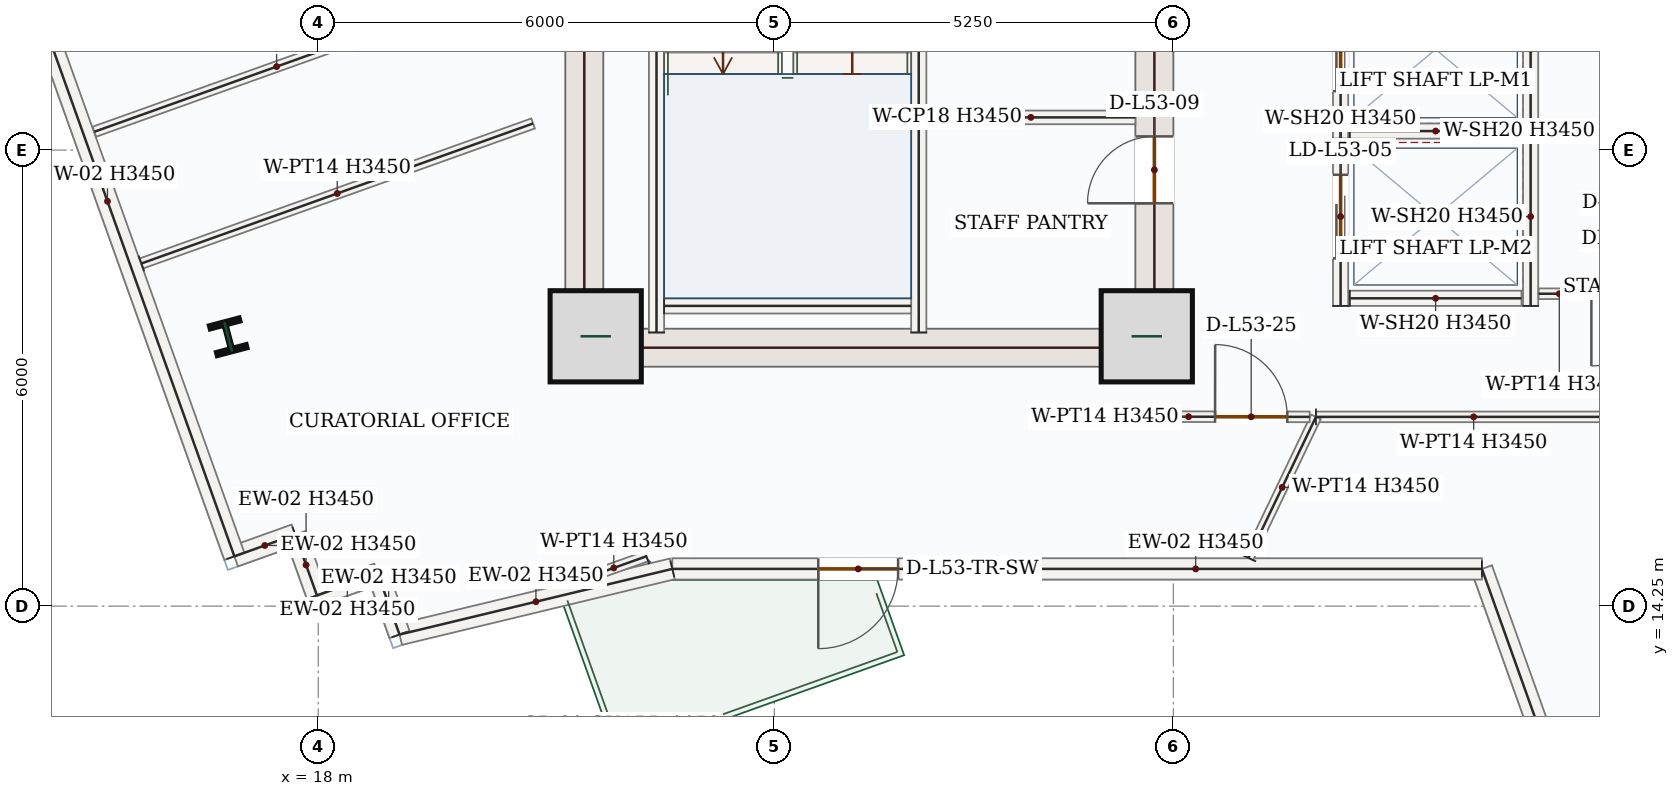
"""IFC4 building model, lengths in metres.
Left out: names, types, materials, properties, quantities, classifications, styles, units other than length and angle.
Written with IfcOpenShell. Run it as: python <this file> out.ifc"""

import sys

from ifc_helpers import new_model, si_unit, direction, frame, frame_2d, origin, origin_2d, place, context, subcontext, project, spatial, rectangle, i_section, extrude, source, transform, mapped, element, fill, save


model = new_model("IFC4")
c1 = context("Model", 3, precision=1e-05, world=origin(), true_north=direction((0.0, 1.0)))
c2 = subcontext(c1, "Body", "Model", "MODEL_VIEW")
j1 = project(units=[si_unit("LENGTHUNIT", "METRE"), si_unit("PLANEANGLEUNIT", "RADIAN")], contexts=[c1])
p1 = place(None, origin())
s1 = spatial("IfcSite", under=j1, at=p1, CompositionType="ELEMENT")
p2 = place(p1, origin())
s2 = spatial("IfcBuilding", under=s1, at=p2, CompositionType="ELEMENT")
p3 = place(p2, frame((0.0, 0.0, 225.3)))
s3 = spatial("IfcBuildingStorey", under=s2, at=p3, CompositionType="ELEMENT", Elevation=225.3)
m1 = source(origin(), c2, "Body", "SweptSolid", [
    extrude(rectangle(XDim=8.55, YDim=0.5, at=frame_2d((4.275, 0.0))), origin(), (0.0, 0.0, 1.0), 3.45),
])
p4 = place(p3, frame((21.5, 17.4, 0.0), z_axis=(0.0, 0.0, 1.0), x_axis=(0.0, 1.0, 0.0)))
e1 = element("IfcWall", 1, at=p4, inside=s3, PredefinedType="SHEAR", context=c2, shape_type="MappedRepresentation", body=[
    mapped(m1, transform((0.0, 0.0, 0.0), x_axis=(1.0, 0.0, 0.0), y_axis=(0.0, 1.0, 0.0), z_axis=(0.0, 0.0, 1.0), scale=1.0)),
])
p5 = place(p3, frame((29.0, 17.4, 0.0), z_axis=(0.0, 0.0, 1.0), x_axis=(0.0, 1.0, 0.0)))
e2 = element("IfcWall", 2, at=p5, inside=s3, PredefinedType="SHEAR", context=c2, shape_type="SweptSolid", body=[
    extrude(rectangle(XDim=8.55, YDim=0.5, at=frame_2d((4.275, 0.0))), origin(), (0.0, 0.0, 1.0), 3.45),
])
p6 = place(p5, frame((6.65, 0.0, 0.0)))
e3 = element("IfcOpeningElement", 3, at=p6, cuts=e2, PredefinedType="OPENING", context=c2, shape_type="SweptSolid", body=[
    extrude(rectangle(XDim=1.1, YDim=2.2, at=frame_2d((0.55, 1.1))), frame((0.0, 0.26, 0.0), z_axis=(0.0, -1.0, 0.0), x_axis=(1.0, 0.0, 0.0)), (0.0, 0.0, 1.0), 0.52),
])
p7 = place(p5, frame((2.15, 0.0, 0.0)))
e4 = element("IfcOpeningElement", 4, at=p7, cuts=e2, PredefinedType="OPENING", context=c2, shape_type="SweptSolid", body=[
    extrude(rectangle(XDim=0.88, YDim=2.1, at=frame_2d((0.44, 1.05))), frame((0.0, 0.26, 0.0), z_axis=(0.0, -1.0, 0.0), x_axis=(1.0, 0.0, 0.0)), (0.0, 0.0, 1.0), 0.52),
])
p8 = place(p5, frame((4.25, 0.0, 0.0)))
e5 = element("IfcOpeningElement", 5, at=p8, cuts=e2, PredefinedType="OPENING", context=c2, shape_type="SweptSolid", body=[
    extrude(rectangle(XDim=0.88, YDim=2.1, at=frame_2d((0.44, 1.05))), frame((0.0, 0.26, 0.0), z_axis=(0.0, -1.0, 0.0), x_axis=(1.0, 0.0, 0.0)), (0.0, 0.0, 1.0), 0.52),
])
m2 = source(origin(), c2, "Body", "SweptSolid", [
    extrude(rectangle(XDim=7.0, YDim=0.5, at=frame_2d((3.5, 0.0))), origin(), (0.0, 0.0, 1.0), 3.45),
])
p9 = place(p3, frame((21.75, 17.65, 0.0), z_axis=(0.0, 0.0, 1.0), x_axis=(1.0, 0.0, 0.0)))
e6 = element("IfcWall", 6, at=p9, inside=s3, PredefinedType="SHEAR", context=c2, shape_type="MappedRepresentation", body=[
    mapped(m2, transform((0.0, 0.0, 0.0), x_axis=(1.0, 0.0, 0.0), y_axis=(0.0, 1.0, 0.0), z_axis=(0.0, 0.0, 1.0), scale=1.0)),
])
m3 = source(origin(), c2, "Body", "SweptSolid", [
    extrude(rectangle(XDim=1.2, YDim=1.2, at=origin_2d()), origin(), (0.0, 0.0, 1.0), 3.9),
])
for number, where, z_axis, x_axis in (
    (7, (21.65, 17.8, 0.0), (0.0, 0.0, 1.0), (1.0, 0.0, 0.0)),
    (8, (28.9, 17.8, 0.0), (0.0, 0.0, 1.0), (1.0, 0.0, 0.0)),
):
    element("IfcColumn", number, at=place(p3, frame(where, z_axis=z_axis, x_axis=x_axis)), inside=s3, PredefinedType="COLUMN", context=c2, shape_type="MappedRepresentation", body=[
        mapped(m3, transform((0.0, 0.0, 0.0), x_axis=(1.0, 0.0, 0.0), y_axis=(0.0, 1.0, 0.0), z_axis=(0.0, 0.0, 1.0), scale=1.0)),
    ])
m4 = source(origin(), c2, "Body", "SweptSolid", [
    extrude(i_section(OverallWidth=0.404, OverallDepth=0.407, WebThickness=0.027, FlangeThickness=0.044, FilletRadius=0.018, at=origin_2d()), origin(), (0.0, 0.0, 1.0), 3.9),
])
p10 = place(p3, frame((16.815, 17.794, 0.0), z_axis=(0.0, 0.0, 1.0), x_axis=(0.966823388604, 0.255445757936, 0.0)))
e9 = element("IfcColumn", 9, at=p10, inside=s3, PredefinedType="COLUMN", context=c2, shape_type="MappedRepresentation", body=[
    mapped(m4, transform((0.0, 0.0, 0.0), x_axis=(1.0, 0.0, 0.0), y_axis=(0.0, 1.0, 0.0), z_axis=(0.0, 0.0, 1.0), scale=1.0)),
])
m5 = source(origin(), c2, "Body", "SweptSolid", [
    extrude(rectangle(XDim=8.721, YDim=0.28, at=frame_2d((4.36, 0.0))), origin(), (0.0, 0.0, 1.0), 3.45),
])
p11 = place(p3, frame((36.244, 6.528, 0.0), z_axis=(0.0, 0.0, 1.0), x_axis=(-0.336554520074, 0.941663982011, 0.0)))
e10 = element("IfcWall", 10, at=p11, inside=s3, PredefinedType="SOLIDWALL", context=c2, shape_type="MappedRepresentation", body=[
    mapped(m5, transform((0.0, 0.0, 0.0), x_axis=(1.0, 0.0, 0.0), y_axis=(0.0, 1.0, 0.0), z_axis=(0.0, 0.0, 1.0), scale=1.0)),
])
p12 = place(p3, frame((33.309, 14.74, 0.0), z_axis=(0.0, 0.0, 1.0), x_axis=(-1.0, 0.0, 0.0)))
e11 = element("IfcWall", 11, at=p12, inside=s3, PredefinedType="SOLIDWALL", context=c2, shape_type="SweptSolid", body=[
    extrude(rectangle(XDim=10.651, YDim=0.28, at=frame_2d((5.326, 0.0))), origin(), (0.0, 0.0, 1.0), 3.45),
])
p13 = place(p12, frame((7.681, 0.0, 0.0)))
e12 = element("IfcOpeningElement", 12, at=p13, cuts=e11, PredefinedType="OPENING", context=c2, shape_type="SweptSolid", body=[
    extrude(rectangle(XDim=1.05, YDim=2.15, at=frame_2d((0.525, 1.075))), frame((0.0, 0.15, 0.0), z_axis=(0.0, -1.0, 0.0), x_axis=(1.0, 0.0, 0.0)), (0.0, 0.0, 1.0), 0.3),
])
m6 = source(origin(), c2, "Body", "SweptSolid", [
    extrude(rectangle(XDim=3.691, YDim=0.28, at=frame_2d((1.846, 0.0))), origin(), (0.0, 0.0, 1.0), 3.45),
])
p14 = place(p3, frame((22.658, 14.74, 0.0), z_axis=(0.0, 0.0, 1.0), x_axis=(-0.972237013355, -0.233998268929, 0.0)))
e13 = element("IfcWall", 13, at=p14, inside=s3, PredefinedType="SOLIDWALL", context=c2, shape_type="MappedRepresentation", body=[
    mapped(m6, transform((0.0, 0.0, 0.0), x_axis=(1.0, 0.0, 0.0), y_axis=(0.0, 1.0, 0.0), z_axis=(0.0, 0.0, 1.0), scale=1.0)),
])
m7 = source(origin(), c2, "Body", "SweptSolid", [
    extrude(rectangle(XDim=0.85, YDim=0.28, at=frame_2d((0.425, 0.0))), origin(), (0.0, 0.0, 1.0), 3.45),
])
p15 = place(p3, frame((19.069, 13.876, 0.0), z_axis=(0.0, 0.0, 1.0), x_axis=(-0.336481891926, 0.941689936447, 0.0)))
e14 = element("IfcWall", 14, at=p15, inside=s3, PredefinedType="SOLIDWALL", context=c2, shape_type="MappedRepresentation", body=[
    mapped(m7, transform((0.0, 0.0, 0.0), x_axis=(1.0, 0.0, 0.0), y_axis=(0.0, 1.0, 0.0), z_axis=(0.0, 0.0, 1.0), scale=1.0)),
])
m8 = source(origin(), c2, "Body", "SweptSolid", [
    extrude(rectangle(XDim=0.85, YDim=0.28, at=frame_2d((0.425, 0.0))), origin(), (0.0, 0.0, 1.0), 3.45),
])
for number, where, z_axis, x_axis in (
    (15, (18.783, 14.677, 0.0), (0.0, 0.0, 1.0), (-0.942, -0.337, 0.0)),
    (16, (17.983, 14.391, 0.0), (0.0, 0.0, 1.0), (-0.337, 0.942, 0.0)),
):
    element("IfcWall", number, at=place(p3, frame(where, z_axis=z_axis, x_axis=x_axis)), inside=s3, PredefinedType="SOLIDWALL", context=c2, shape_type="MappedRepresentation", body=[
        mapped(m8, transform((0.0, 0.0, 0.0), x_axis=(1.0, 0.0, 0.0), y_axis=(0.0, 1.0, 0.0), z_axis=(0.0, 0.0, 1.0), scale=1.0)),
    ])
m9 = source(origin(), c2, "Body", "SweptSolid", [
    extrude(rectangle(XDim=0.85, YDim=0.28, at=frame_2d((0.425, 0.0))), origin(), (0.0, 0.0, 1.0), 3.45),
])
p16 = place(p3, frame((17.697, 15.191, 0.0), z_axis=(0.0, 0.0, 1.0), x_axis=(-0.941657417713, -0.336572886112, 0.0)))
e17 = element("IfcWall", 17, at=p16, inside=s3, PredefinedType="SOLIDWALL", context=c2, shape_type="MappedRepresentation", body=[
    mapped(m9, transform((0.0, 0.0, 0.0), x_axis=(1.0, 0.0, 0.0), y_axis=(0.0, 1.0, 0.0), z_axis=(0.0, 0.0, 1.0), scale=1.0)),
])
m10 = source(origin(), c2, "Body", "SweptSolid", [
    extrude(rectangle(XDim=9.92, YDim=0.28, at=frame_2d((4.96, 0.0))), origin(), (0.0, 0.0, 1.0), 3.45),
])
p17 = place(p3, frame((16.896, 14.905, 0.0), z_axis=(0.0, 0.0, 1.0), x_axis=(-0.336532833412, 0.941671732631, 0.0)))
e18 = element("IfcWall", 18, at=p17, inside=s3, PredefinedType="SOLIDWALL", context=c2, shape_type="MappedRepresentation", body=[
    mapped(m10, transform((0.0, 0.0, 0.0), x_axis=(1.0, 0.0, 0.0), y_axis=(0.0, 1.0, 0.0), z_axis=(0.0, 0.0, 1.0), scale=1.0)),
])
m11 = source(origin(), c2, "Body", "SweptSolid", [
    extrude(rectangle(XDim=7.87, YDim=0.2, at=frame_2d((3.935, 0.0))), origin(), (0.0, 0.0, 1.0), 3.45),
])
p18 = place(p3, frame((22.45, 17.85, 0.0), z_axis=(0.0, 0.0, 1.0), x_axis=(0.0, 1.0, 0.0)))
e19 = element("IfcWall", 19, at=p18, inside=s3, PredefinedType="SOLIDWALL", context=c2, shape_type="MappedRepresentation", body=[
    mapped(m11, transform((0.0, 0.0, 0.0), x_axis=(1.0, 0.0, 0.0), y_axis=(0.0, 1.0, 0.0), z_axis=(0.0, 0.0, 1.0), scale=1.0)),
])
p19 = place(p3, frame((25.9, 17.85, 0.0), z_axis=(0.0, 0.0, 1.0), x_axis=(0.0, 1.0, 0.0)))
e20 = element("IfcWall", 20, at=p19, inside=s3, PredefinedType="SOLIDWALL", context=c2, shape_type="SweptSolid", body=[
    extrude(rectangle(XDim=8.0, YDim=0.2, at=frame_2d((4.0, 0.0))), origin(), (0.0, 0.0, 1.0), 3.45),
])
p20 = place(p19, frame((6.3, 0.0, 0.0)))
e21 = element("IfcOpeningElement", 21, at=p20, cuts=e20, PredefinedType="OPENING", context=c2, shape_type="SweptSolid", body=[
    extrude(rectangle(XDim=1.05, YDim=2.15, at=frame_2d((0.525, 1.075))), frame((0.0, 0.11, 0.0), z_axis=(0.0, -1.0, 0.0), x_axis=(1.0, 0.0, 0.0)), (0.0, 0.0, 1.0), 0.22),
])
m12 = source(origin(), c2, "Body", "SweptSolid", [
    extrude(rectangle(XDim=3.25, YDim=0.2, at=frame_2d((1.625, 0.0))), origin(), (0.0, 0.0, 1.0), 3.45),
])
p21 = place(p3, frame((22.55, 18.2, 0.0), z_axis=(0.0, 0.0, 1.0), x_axis=(1.0, 0.0, 0.0)))
e22 = element("IfcWall", 22, at=p21, inside=s3, PredefinedType="SOLIDWALL", context=c2, shape_type="MappedRepresentation", body=[
    mapped(m12, transform((0.0, 0.0, 0.0), x_axis=(1.0, 0.0, 0.0), y_axis=(0.0, 1.0, 0.0), z_axis=(0.0, 0.0, 1.0), scale=1.0)),
])
m13 = source(origin(), c2, "Body", "SweptSolid", [
    extrude(rectangle(XDim=2.75, YDim=0.18, at=frame_2d((1.375, 0.0))), origin(), (0.0, 0.0, 1.0), 3.45),
])
p22 = place(p3, frame((26.0, 20.68, 0.0), z_axis=(0.0, 0.0, 1.0), x_axis=(1.0, 0.0, 0.0)))
e23 = element("IfcWall", 23, at=p22, inside=s3, PredefinedType="PARTITIONING", context=c2, shape_type="MappedRepresentation", body=[
    mapped(m13, transform((0.0, 0.0, 0.0), x_axis=(1.0, 0.0, 0.0), y_axis=(0.0, 1.0, 0.0), z_axis=(0.0, 0.0, 1.0), scale=1.0)),
])
p23 = place(p3, frame((31.45, 20.4, 0.0), z_axis=(0.0, 0.0, 1.0), x_axis=(0.0, 1.0, 0.0)))
e24 = element("IfcWall", 24, at=p23, inside=s3, PredefinedType="SOLIDWALL", context=c2, shape_type="SweptSolid", body=[
    extrude(rectangle(XDim=2.35, YDim=0.2, at=frame_2d((1.175, 0.0))), origin(), (0.0, 0.0, 1.0), 3.45),
])
p24 = place(p23, frame((0.625, 0.0, 0.0)))
e25 = element("IfcOpeningElement", 25, at=p24, cuts=e24, PredefinedType="OPENING", context=c2, shape_type="SweptSolid", body=[
    extrude(rectangle(XDim=1.1, YDim=2.15, at=frame_2d((0.55, 1.075))), frame((0.0, 0.11, 0.0), z_axis=(0.0, -1.0, 0.0), x_axis=(1.0, 0.0, 0.0)), (0.0, 0.0, 1.0), 0.22),
])
m14 = source(origin(), c2, "Body", "SweptSolid", [
    extrude(rectangle(XDim=2.35, YDim=0.2, at=frame_2d((1.175, 0.0))), origin(), (0.0, 0.0, 1.0), 3.45),
])
p25 = place(p3, frame((33.95, 20.4, 0.0), z_axis=(0.0, 0.0, 1.0), x_axis=(0.0, 1.0, 0.0)))
e26 = element("IfcWall", 26, at=p25, inside=s3, PredefinedType="SOLIDWALL", context=c2, shape_type="MappedRepresentation", body=[
    mapped(m14, transform((0.0, 0.0, 0.0), x_axis=(1.0, 0.0, 0.0), y_axis=(0.0, 1.0, 0.0), z_axis=(0.0, 0.0, 1.0), scale=1.0)),
])
m15 = source(origin(), c2, "Body", "SweptSolid", [
    extrude(rectangle(XDim=2.26, YDim=0.2, at=frame_2d((1.13, 0.0))), origin(), (0.0, 0.0, 1.0), 3.45),
])
p26 = place(p3, frame((31.57, 20.5, 0.0), z_axis=(0.0, 0.0, 1.0), x_axis=(1.0, 0.0, 0.0)))
e27 = element("IfcWall", 27, at=p26, inside=s3, PredefinedType="SOLIDWALL", context=c2, shape_type="MappedRepresentation", body=[
    mapped(m15, transform((0.0, 0.0, 0.0), x_axis=(1.0, 0.0, 0.0), y_axis=(0.0, 1.0, 0.0), z_axis=(0.0, 0.0, 1.0), scale=1.0)),
])
p27 = place(p3, frame((31.45, 18.2, 0.0), z_axis=(0.0, 0.0, 1.0), x_axis=(0.0, 1.0, 0.0)))
e28 = element("IfcWall", 28, at=p27, inside=s3, PredefinedType="SOLIDWALL", context=c2, shape_type="SweptSolid", body=[
    extrude(rectangle(XDim=2.35, YDim=0.2, at=frame_2d((1.175, 0.0))), origin(), (0.0, 0.0, 1.0), 3.45),
])
p28 = place(p27, frame((0.625, 0.0, 0.0)))
e29 = element("IfcOpeningElement", 29, at=p28, cuts=e28, PredefinedType="OPENING", context=c2, shape_type="SweptSolid", body=[
    extrude(rectangle(XDim=1.1, YDim=2.15, at=frame_2d((0.55, 1.075))), frame((0.0, 0.11, 0.0), z_axis=(0.0, -1.0, 0.0), x_axis=(1.0, 0.0, 0.0)), (0.0, 0.0, 1.0), 0.22),
])
p29 = place(p3, frame((33.95, 18.2, 0.0), z_axis=(0.0, 0.0, 1.0), x_axis=(0.0, 1.0, 0.0)))
e30 = element("IfcWall", 30, at=p29, inside=s3, PredefinedType="SOLIDWALL", context=c2, shape_type="MappedRepresentation", body=[
    mapped(m14, transform((0.0, 0.0, 0.0), x_axis=(1.0, 0.0, 0.0), y_axis=(0.0, 1.0, 0.0), z_axis=(0.0, 0.0, 1.0), scale=1.0)),
])
p30 = place(p3, frame((31.57, 18.3, 0.0), z_axis=(0.0, 0.0, 1.0), x_axis=(1.0, 0.0, 0.0)))
e31 = element("IfcWall", 31, at=p30, inside=s3, PredefinedType="SOLIDWALL", context=c2, shape_type="MappedRepresentation", body=[
    mapped(m15, transform((0.0, 0.0, 0.0), x_axis=(1.0, 0.0, 0.0), y_axis=(0.0, 1.0, 0.0), z_axis=(0.0, 0.0, 1.0), scale=1.0)),
])
p31 = place(p3, frame((35.895, 18.36, 0.0), z_axis=(0.0, 0.0, 1.0), x_axis=(-1.0, 0.0, 0.0)))
e32 = element("IfcWall", 32, at=p31, inside=s3, PredefinedType="PARTITIONING", context=c2, shape_type="SweptSolid", body=[
    extrude(rectangle(XDim=1.84, YDim=0.14, at=frame_2d((0.92, 0.0))), origin(), (0.0, 0.0, 1.0), 3.45),
])
p32 = place(p31, frame((0.196, 0.0, 0.0)))
e33 = element("IfcOpeningElement", 33, at=p32, cuts=e32, PredefinedType="OPENING", context=c2, shape_type="SweptSolid", body=[
    extrude(rectangle(XDim=0.95, YDim=2.15, at=frame_2d((0.475, 1.075))), frame((0.0, 0.08, 0.0), z_axis=(0.0, -1.0, 0.0), x_axis=(1.0, 0.0, 0.0)), (0.0, 0.0, 1.0), 0.16),
])
m16 = source(origin(), c2, "Body", "SweptSolid", [
    extrude(rectangle(XDim=5.093, YDim=0.14, at=frame_2d((2.547, 0.0))), origin(), (0.0, 0.0, 1.0), 3.45),
])
p33 = place(p3, frame((19.85, 22.205, 0.0), z_axis=(0.0, 0.0, 1.0), x_axis=(-0.941667058904, -0.336545910947, 0.0)))
e34 = element("IfcWall", 34, at=p33, inside=s3, PredefinedType="PARTITIONING", context=c2, shape_type="MappedRepresentation", body=[
    mapped(m16, transform((0.0, 0.0, 0.0), x_axis=(1.0, 0.0, 0.0), y_axis=(0.0, 1.0, 0.0), z_axis=(0.0, 0.0, 1.0), scale=1.0)),
])
p34 = place(p3, frame((31.126, 16.74, 0.0), z_axis=(0.0, 0.0, 1.0), x_axis=(1.0, 0.0, 0.0)))
e35 = element("IfcWall", 35, at=p34, inside=s3, PredefinedType="PARTITIONING", context=c2, shape_type="SweptSolid", body=[
    extrude(rectangle(XDim=7.564, YDim=0.14, at=frame_2d((3.782, 0.0))), origin(), (0.0, 0.0, 1.0), 3.45),
])
p35 = place(p34, frame((4.299, 0.0, 0.0)))
e36 = element("IfcOpeningElement", 36, at=p35, cuts=e35, PredefinedType="OPENING", context=c2, shape_type="SweptSolid", body=[
    extrude(rectangle(XDim=0.95, YDim=2.15, at=frame_2d((0.475, 1.075))), frame((0.0, 0.08, 0.0), z_axis=(0.0, -1.0, 0.0), x_axis=(1.0, 0.0, 0.0)), (0.0, 0.0, 1.0), 0.16),
])
m17 = source(origin(), c2, "Body", "SweptSolid", [
    extrude(rectangle(XDim=2.057, YDim=0.14, at=frame_2d((1.028, 0.0))), origin(), (0.0, 0.0, 1.0), 3.45),
])
p36 = place(p3, frame((30.237, 14.885, 0.0), z_axis=(0.0, 0.0, 1.0), x_axis=(0.43214833388, 0.90180253799, 0.0)))
e37 = element("IfcWall", 37, at=p36, inside=s3, PredefinedType="PARTITIONING", context=c2, shape_type="MappedRepresentation", body=[
    mapped(m17, transform((0.0, 0.0, 0.0), x_axis=(1.0, 0.0, 0.0), y_axis=(0.0, 1.0, 0.0), z_axis=(0.0, 0.0, 1.0), scale=1.0)),
])
p37 = place(p3, frame((29.252, 16.743, 0.0), z_axis=(0.0, 0.0, 1.0), x_axis=(0.999998876126, -0.00149924869, 0.0)))
e38 = element("IfcWall", 38, at=p37, inside=s3, PredefinedType="PARTITIONING", context=c2, shape_type="SweptSolid", body=[
    extrude(rectangle(XDim=1.791, YDim=0.14, at=frame_2d((0.896, 0.0))), origin(), (0.0, 0.0, 1.0), 3.45),
])
p38 = place(p37, frame((0.547, 0.0, 0.0)))
e39 = element("IfcOpeningElement", 39, at=p38, cuts=e38, PredefinedType="OPENING", context=c2, shape_type="SweptSolid", body=[
    extrude(rectangle(XDim=0.95, YDim=2.15, at=frame_2d((0.475, 1.075))), frame((0.0, 0.08, 0.0), z_axis=(0.0, -1.0, 0.0), x_axis=(1.0, 0.0, 0.0)), (0.0, 0.0, 1.0), 0.16),
])
m18 = source(origin(), c2, "Body", "SweptSolid", [
    extrude(rectangle(XDim=0.911, YDim=0.14, at=frame_2d((0.456, 0.0))), origin(), (0.0, 0.0, 1.0), 3.45),
])
p39 = place(p3, frame((22.317, 14.906, 0.0), z_axis=(0.0, 0.0, 1.0), x_axis=(-0.942111242134, -0.335300473374, 0.0)))
e40 = element("IfcWall", 40, at=p39, inside=s3, PredefinedType="PARTITIONING", context=c2, shape_type="MappedRepresentation", body=[
    mapped(m18, transform((0.0, 0.0, 0.0), x_axis=(1.0, 0.0, 0.0), y_axis=(0.0, 1.0, 0.0), z_axis=(0.0, 0.0, 1.0), scale=1.0)),
])
m19 = source(origin(), c2, "Body", "SweptSolid", [
    extrude(rectangle(XDim=5.473, YDim=0.14, at=frame_2d((2.736, 0.0))), origin(), (0.0, 0.0, 1.0), 3.45),
])
p40 = place(p3, frame((15.673, 18.758, 0.0), z_axis=(0.0, 0.0, 1.0), x_axis=(0.941665179086, 0.336551170695, 0.0)))
e41 = element("IfcWall", 41, at=p40, inside=s3, PredefinedType="PARTITIONING", context=c2, shape_type="MappedRepresentation", body=[
    mapped(m19, transform((0.0, 0.0, 0.0), x_axis=(1.0, 0.0, 0.0), y_axis=(0.0, 1.0, 0.0), z_axis=(0.0, 0.0, 1.0), scale=1.0)),
])
m20 = source(origin(), c2, "Body", "SweptSolid", [
    extrude(rectangle(XDim=1.05, YDim=2.15, at=frame_2d((0.525, 1.075))), frame((0.0, 0.025, 0.0), z_axis=(0.0, -1.0, 0.0), x_axis=(1.0, 0.0, 0.0)), (0.0, 0.0, 1.0), 0.05),
])
p41 = place(p13, origin())
e42 = element("IfcDoor", 42, at=p41, inside=s3, OperationType="SINGLE_SWING_RIGHT", PredefinedType="DOOR", context=c2, shape_type="MappedRepresentation", body=[
    mapped(m20, transform((0.0, 0.0, 0.0), x_axis=(1.0, 0.0, 0.0), y_axis=(0.0, 1.0, 0.0), z_axis=(0.0, 0.0, 1.0), scale=1.0)),
])
fill(e12, e42)
m21 = source(origin(), c2, "Body", "SweptSolid", [
    extrude(rectangle(XDim=0.88, YDim=2.1, at=frame_2d((0.44, 1.05))), frame((0.0, 0.025, 0.0), z_axis=(0.0, -1.0, 0.0), x_axis=(1.0, 0.0, 0.0)), (0.0, 0.0, 1.0), 0.05),
])
p42 = place(p7, origin())
e43 = element("IfcDoor", 43, at=p42, inside=s3, OperationType="SINGLE_SWING_LEFT", PredefinedType="DOOR", context=c2, shape_type="MappedRepresentation", body=[
    mapped(m21, transform((0.0, 0.0, 0.0), x_axis=(1.0, 0.0, 0.0), y_axis=(0.0, 1.0, 0.0), z_axis=(0.0, 0.0, 1.0), scale=1.0)),
])
fill(e4, e43)
m22 = source(origin(), c2, "Body", "SweptSolid", [
    extrude(rectangle(XDim=1.1, YDim=2.15, at=frame_2d((0.55, 1.075))), frame((0.0, 0.025, 0.0), z_axis=(0.0, -1.0, 0.0), x_axis=(1.0, 0.0, 0.0)), (0.0, 0.0, 1.0), 0.05),
])
p43 = place(p24, origin())
e44 = element("IfcDoor", 44, at=p43, inside=s3, OperationType="DOUBLE_DOOR_SLIDING", PredefinedType="DOOR", context=c2, shape_type="MappedRepresentation", body=[
    mapped(m22, transform((0.0, 0.0, 0.0), x_axis=(1.0, 0.0, 0.0), y_axis=(0.0, 1.0, 0.0), z_axis=(0.0, 0.0, 1.0), scale=1.0)),
])
fill(e25, e44)
p44 = place(p28, origin())
e45 = element("IfcDoor", 45, at=p44, inside=s3, OperationType="DOUBLE_DOOR_SLIDING", PredefinedType="DOOR", context=c2, shape_type="MappedRepresentation", body=[
    mapped(m22, transform((0.0, 0.0, 0.0), x_axis=(1.0, 0.0, 0.0), y_axis=(0.0, 1.0, 0.0), z_axis=(0.0, 0.0, 1.0), scale=1.0)),
])
fill(e29, e45)
m23 = source(origin(), c2, "Body", "SweptSolid", [
    extrude(rectangle(XDim=0.95, YDim=2.15, at=frame_2d((0.475, 1.075))), frame((0.0, 0.025, 0.0), z_axis=(0.0, -1.0, 0.0), x_axis=(1.0, 0.0, 0.0)), (0.0, 0.0, 1.0), 0.05),
])
p45 = place(p32, origin())
e46 = element("IfcDoor", 46, at=p45, inside=s3, OperationType="SINGLE_SWING_RIGHT", PredefinedType="DOOR", context=c2, shape_type="MappedRepresentation", body=[
    mapped(m23, transform((0.0, 0.0, 0.0), x_axis=(1.0, 0.0, 0.0), y_axis=(0.0, 1.0, 0.0), z_axis=(0.0, 0.0, 1.0), scale=1.0)),
])
fill(e33, e46)
p46 = place(p38, origin())
e47 = element("IfcDoor", 47, at=p46, inside=s3, OperationType="SINGLE_SWING_LEFT", PredefinedType="DOOR", context=c2, shape_type="MappedRepresentation", body=[
    mapped(m23, transform((0.0, 0.0, 0.0), x_axis=(1.0, 0.0, 0.0), y_axis=(0.0, 1.0, 0.0), z_axis=(0.0, 0.0, 1.0), scale=1.0)),
])
fill(e39, e47)
save(model, sys.argv[1])
